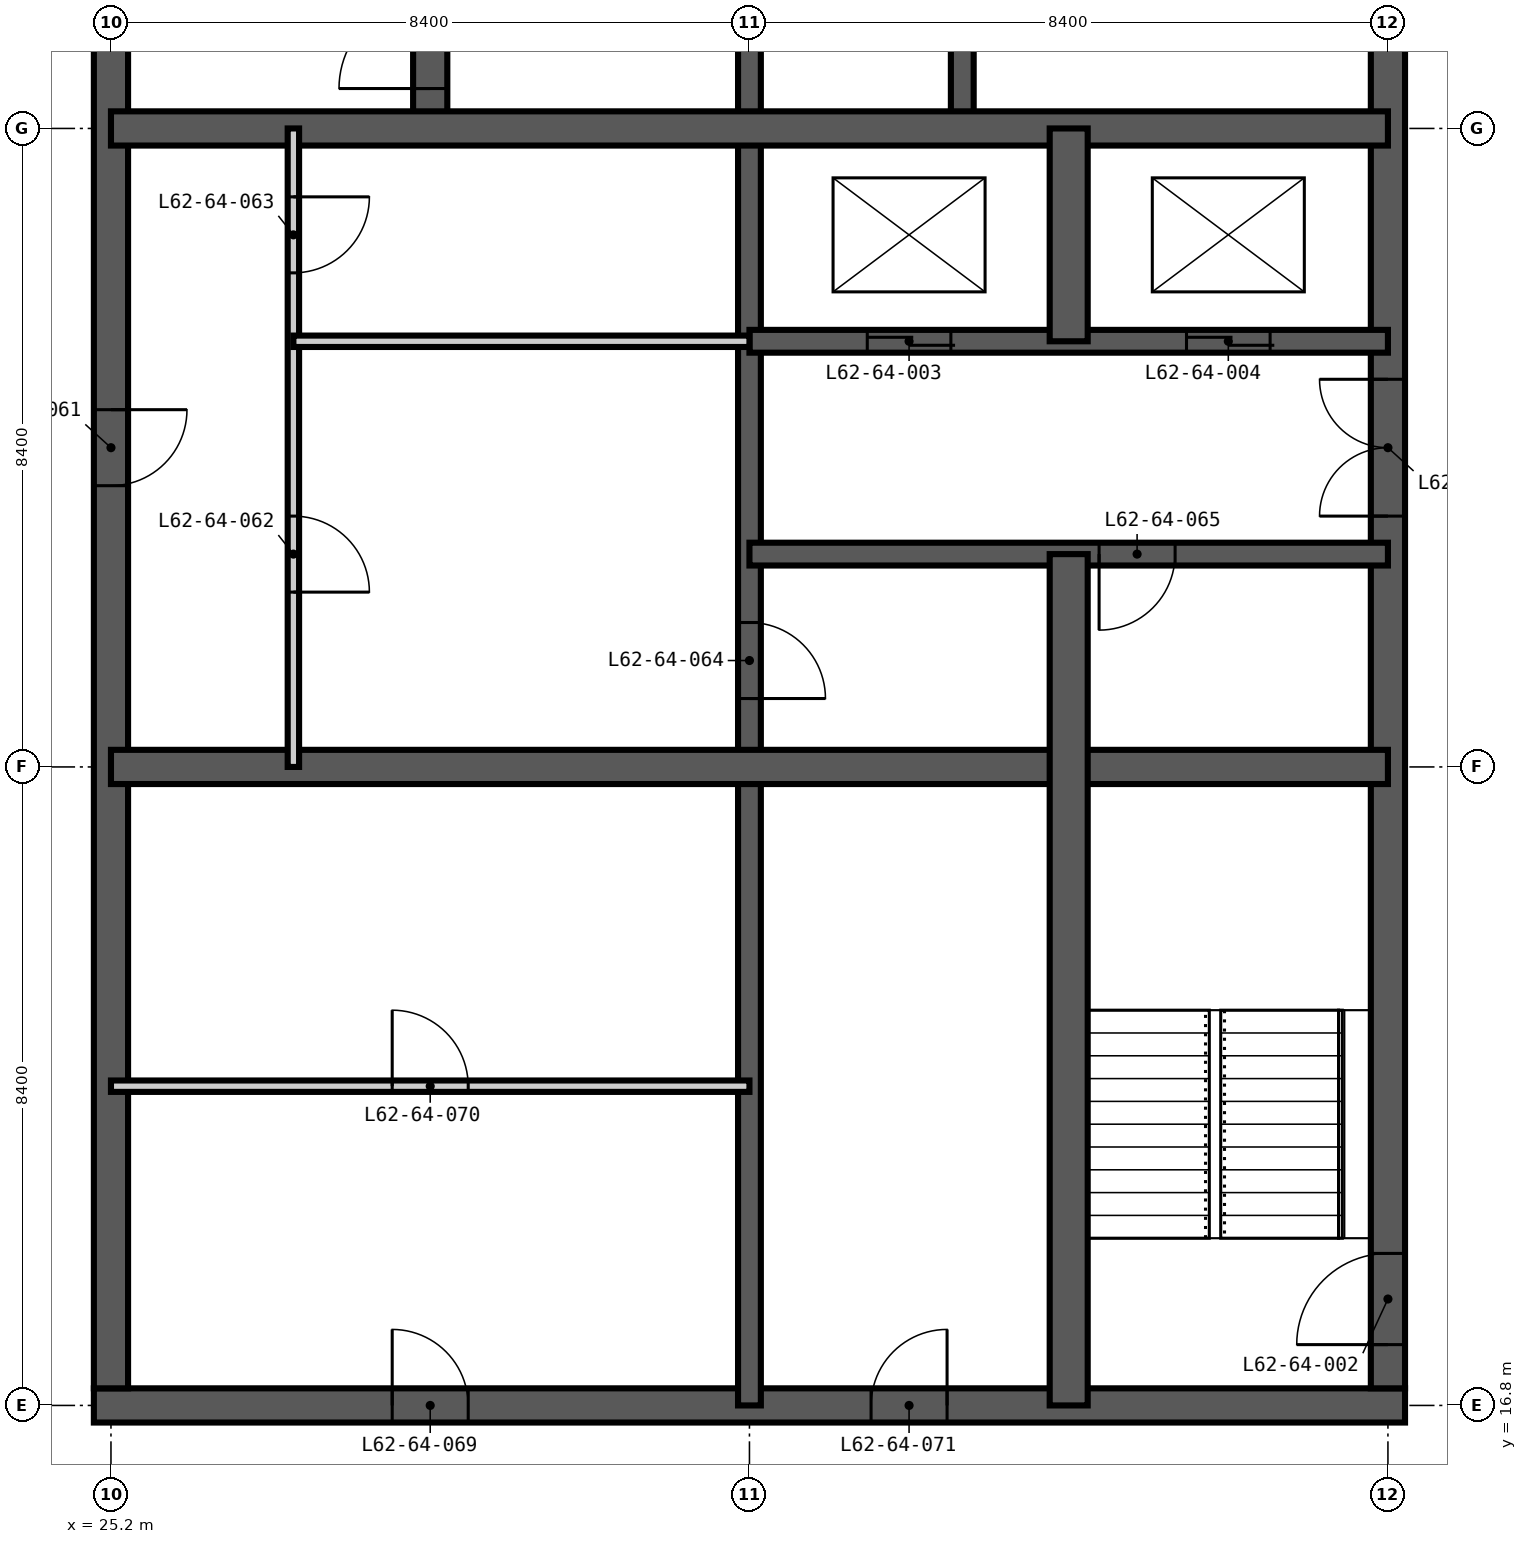
"""IFC4 building model, lengths in metres.
Left out: names, types, materials, properties, quantities, classifications, styles, units other than length and angle.
Written with IfcOpenShell. Run it as: python <this file> out.ifc"""

import sys

from ifc_helpers import new_model, si_unit, direction, frame, frame_2d, origin, place, context, subcontext, project, spatial, rectangle, extrude, element, fill, save


model = new_model("IFC4")
c1 = context("Model", 3, precision=1e-05, world=origin(), true_north=direction((0.0, 1.0)))
c2 = subcontext(c1, "Body", "Model", "MODEL_VIEW")
j1 = project(units=[si_unit("LENGTHUNIT", "METRE"), si_unit("PLANEANGLEUNIT", "RADIAN")], contexts=[c1])
p1 = place(None, origin())
s1 = spatial("IfcSite", under=j1, at=p1, CompositionType="ELEMENT")
p2 = place(p1, origin())
s2 = spatial("IfcBuilding", under=s1, at=p2, CompositionType="ELEMENT")
p3 = place(p2, frame((0.0, 0.0, 241.2)))
s3 = spatial("IfcBuildingStorey", under=s2, at=p3, CompositionType="ELEMENT", Elevation=241.2)
p4 = place(p3, frame((24.975, 16.8, -0.35), z_axis=(0.0, 0.0, 1.0), x_axis=(1.0, 0.0, 0.0)))
e1 = element("IfcWall", 1, at=p4, inside=s3, PredefinedType="SHEAR", context=c2, shape_type="SweptSolid", body=[
    extrude(rectangle(XDim=17.25, YDim=0.45, at=frame_2d((8.625, 0.0))), origin(), (0.0, 0.0, 1.0), 3.9),
])
p5 = place(p4, frame((3.925, 0.0, 0.35)))
e2 = element("IfcOpeningElement", 2, at=p5, cuts=e1, PredefinedType="OPENING", context=c2, shape_type="SweptSolid", body=[
    extrude(rectangle(XDim=1.0, YDim=2.1, at=frame_2d((0.5, 1.05))), frame((0.0, 0.235, 0.0), z_axis=(0.0, -1.0, 0.0), x_axis=(1.0, 0.0, 0.0)), (0.0, 0.0, 1.0), 0.47),
])
p6 = place(p4, frame((10.225, 0.0, 0.35)))
e3 = element("IfcOpeningElement", 3, at=p6, cuts=e1, PredefinedType="OPENING", context=c2, shape_type="SweptSolid", body=[
    extrude(rectangle(XDim=1.0, YDim=2.1, at=frame_2d((0.5, 1.05))), frame((0.0, 0.235, 0.0), z_axis=(0.0, -1.0, 0.0), x_axis=(1.0, 0.0, 0.0)), (0.0, 0.0, 1.0), 0.47),
])
p7 = place(p3, frame((42.0, 17.025, -0.35), z_axis=(0.0, 0.0, 1.0), x_axis=(0.0, 1.0, 0.0)))
e4 = element("IfcWall", 4, at=p7, inside=s3, PredefinedType="SHEAR", context=c2, shape_type="SweptSolid", body=[
    extrude(rectangle(XDim=24.75, YDim=0.45, at=frame_2d((12.375, 0.0))), origin(), (0.0, 0.0, 1.0), 3.9),
])
p8 = place(p7, frame((0.575, 0.0, 0.35)))
e5 = element("IfcOpeningElement", 5, at=p8, cuts=e4, PredefinedType="OPENING", context=c2, shape_type="SweptSolid", body=[
    extrude(rectangle(XDim=1.2, YDim=2.2, at=frame_2d((0.6, 1.1))), frame((0.0, 0.235, 0.0), z_axis=(0.0, -1.0, 0.0), x_axis=(1.0, 0.0, 0.0)), (0.0, 0.0, 1.0), 0.47),
])
p9 = place(p7, frame((11.475, 0.0, 0.35)))
e6 = element("IfcOpeningElement", 6, at=p9, cuts=e4, PredefinedType="OPENING", context=c2, shape_type="SweptSolid", body=[
    extrude(rectangle(XDim=1.8, YDim=2.2, at=frame_2d((0.9, 1.1))), frame((0.0, 0.235, 0.0), z_axis=(0.0, -1.0, 0.0), x_axis=(1.0, 0.0, 0.0)), (0.0, 0.0, 1.0), 0.47),
])
p10 = place(p7, frame((20.275, 0.0, 0.35)))
e7 = element("IfcOpeningElement", 7, at=p10, cuts=e4, PredefinedType="OPENING", context=c2, shape_type="SweptSolid", body=[
    extrude(rectangle(XDim=1.0, YDim=2.1, at=frame_2d((0.5, 1.05))), frame((0.0, 0.235, 0.0), z_axis=(0.0, -1.0, 0.0), x_axis=(1.0, 0.0, 0.0)), (0.0, 0.0, 1.0), 0.47),
])
p11 = place(p3, frame((25.2, 41.775, -0.35), z_axis=(0.0, 0.0, 1.0), x_axis=(0.0, -1.0, 0.0)))
e8 = element("IfcWall", 8, at=p11, inside=s3, PredefinedType="SHEAR", context=c2, shape_type="SweptSolid", body=[
    extrude(rectangle(XDim=24.75, YDim=0.45, at=frame_2d((12.375, 0.0))), origin(), (0.0, 0.0, 1.0), 3.9),
])
p12 = place(p11, frame((11.875, 0.0, 0.35)))
e9 = element("IfcOpeningElement", 9, at=p12, cuts=e8, PredefinedType="OPENING", context=c2, shape_type="SweptSolid", body=[
    extrude(rectangle(XDim=1.0, YDim=2.1, at=frame_2d((0.5, 1.05))), frame((0.0, 0.235, 0.0), z_axis=(0.0, -1.0, 0.0), x_axis=(1.0, 0.0, 0.0)), (0.0, 0.0, 1.0), 0.47),
])
p13 = place(p3, frame((33.6, 16.8, -0.35), z_axis=(0.0, 0.0, 1.0), x_axis=(0.0, 1.0, 0.0)))
e10 = element("IfcWall", 10, at=p13, inside=s3, PredefinedType="SHEAR", context=c2, shape_type="SweptSolid", body=[
    extrude(rectangle(XDim=25.2, YDim=0.3, at=frame_2d((12.6, 0.0))), origin(), (0.0, 0.0, 1.0), 3.9),
])
p14 = place(p13, frame((22.5, 0.0, 0.35)))
e11 = element("IfcOpeningElement", 11, at=p14, cuts=e10, PredefinedType="OPENING", context=c2, shape_type="SweptSolid", body=[
    extrude(rectangle(XDim=1.2, YDim=2.2, at=frame_2d((0.6, 1.1))), frame((0.0, 0.16, 0.0), z_axis=(0.0, -1.0, 0.0), x_axis=(1.0, 0.0, 0.0)), (0.0, 0.0, 1.0), 0.32),
])
p15 = place(p13, frame((18.3, 0.0, 0.35)))
e12 = element("IfcOpeningElement", 12, at=p15, cuts=e10, PredefinedType="OPENING", context=c2, shape_type="SweptSolid", body=[
    extrude(rectangle(XDim=1.2, YDim=2.2, at=frame_2d((0.6, 1.1))), frame((0.0, 0.16, 0.0), z_axis=(0.0, -1.0, 0.0), x_axis=(1.0, 0.0, 0.0)), (0.0, 0.0, 1.0), 0.32),
])
p16 = place(p13, frame((9.3, 0.0, 0.35)))
e13 = element("IfcOpeningElement", 13, at=p16, cuts=e10, PredefinedType="OPENING", context=c2, shape_type="SweptSolid", body=[
    extrude(rectangle(XDim=1.0, YDim=2.1, at=frame_2d((0.5, 1.05))), frame((0.0, 0.16, 0.0), z_axis=(0.0, -1.0, 0.0), x_axis=(1.0, 0.0, 0.0)), (0.0, 0.0, 1.0), 0.32),
])
p17 = place(p3, frame((36.4, 33.6, -0.35), z_axis=(0.0, 0.0, 1.0), x_axis=(0.0, 1.0, 0.0)))
e14 = element("IfcWall", 14, at=p17, inside=s3, PredefinedType="SHEAR", context=c2, shape_type="SweptSolid", body=[
    extrude(rectangle(XDim=8.4, YDim=0.3, at=frame_2d((4.2, 0.0))), origin(), (0.0, 0.0, 1.0), 3.9),
])
p18 = place(p3, frame((33.6, 28.0, -0.35), z_axis=(0.0, 0.0, 1.0), x_axis=(1.0, 0.0, 0.0)))
e15 = element("IfcWall", 15, at=p18, inside=s3, PredefinedType="SHEAR", context=c2, shape_type="SweptSolid", body=[
    extrude(rectangle(XDim=8.4, YDim=0.3, at=frame_2d((4.2, 0.0))), origin(), (0.0, 0.0, 1.0), 3.9),
])
p19 = place(p18, frame((4.6, 0.0, 0.35)))
e16 = element("IfcOpeningElement", 16, at=p19, cuts=e15, PredefinedType="OPENING", context=c2, shape_type="SweptSolid", body=[
    extrude(rectangle(XDim=1.0, YDim=2.1, at=frame_2d((0.5, 1.05))), frame((0.0, 0.16, 0.0), z_axis=(0.0, -1.0, 0.0), x_axis=(1.0, 0.0, 0.0)), (0.0, 0.0, 1.0), 0.32),
])
p20 = place(p3, frame((33.6, 30.8, -0.35), z_axis=(0.0, 0.0, 1.0), x_axis=(1.0, 0.0, 0.0)))
e17 = element("IfcWall", 17, at=p20, inside=s3, PredefinedType="SHEAR", context=c2, shape_type="SweptSolid", body=[
    extrude(rectangle(XDim=8.4, YDim=0.3, at=frame_2d((4.2, 0.0))), origin(), (0.0, 0.0, 1.0), 3.9),
])
p21 = place(p20, frame((1.55, 0.0, 0.35)))
e18 = element("IfcOpeningElement", 18, at=p21, cuts=e17, PredefinedType="OPENING", context=c2, shape_type="SweptSolid", body=[
    extrude(rectangle(XDim=1.1, YDim=2.2, at=frame_2d((0.55, 1.1))), frame((0.0, 0.16, 0.0), z_axis=(0.0, -1.0, 0.0), x_axis=(1.0, 0.0, 0.0)), (0.0, 0.0, 1.0), 0.32),
])
p22 = place(p20, frame((5.75, 0.0, 0.35)))
e19 = element("IfcOpeningElement", 19, at=p22, cuts=e17, PredefinedType="OPENING", context=c2, shape_type="SweptSolid", body=[
    extrude(rectangle(XDim=1.1, YDim=2.2, at=frame_2d((0.55, 1.1))), frame((0.0, 0.16, 0.0), z_axis=(0.0, -1.0, 0.0), x_axis=(1.0, 0.0, 0.0)), (0.0, 0.0, 1.0), 0.32),
])
p23 = place(p3, frame((29.4, 33.6, -0.35), z_axis=(0.0, 0.0, 1.0), x_axis=(0.0, 1.0, 0.0)))
e20 = element("IfcWall", 20, at=p23, inside=s3, PredefinedType="SHEAR", context=c2, shape_type="SweptSolid", body=[
    extrude(rectangle(XDim=8.4, YDim=0.45, at=frame_2d((4.2, 0.0))), origin(), (0.0, 0.0, 1.0), 3.9),
])
p24 = place(p23, frame((0.525, 0.0, 0.35)))
e21 = element("IfcOpeningElement", 21, at=p24, cuts=e20, PredefinedType="OPENING", context=c2, shape_type="SweptSolid", body=[
    extrude(rectangle(XDim=1.2, YDim=2.2, at=frame_2d((0.6, 1.1))), frame((0.0, 0.235, 0.0), z_axis=(0.0, -1.0, 0.0), x_axis=(1.0, 0.0, 0.0)), (0.0, 0.0, 1.0), 0.47),
])
for number, where, z_axis, x_axis in (
    (22, (25.2, 25.2, -0.35), (0.0, 0.0, 1.0), (1.0, 0.0, 0.0)),
    (23, (25.2, 33.6, -0.35), (0.0, 0.0, 1.0), (1.0, 0.0, 0.0)),
):
    element("IfcWall", number, at=place(p3, frame(where, z_axis=z_axis, x_axis=x_axis)), inside=s3, PredefinedType="SHEAR", context=c2, shape_type="SweptSolid", body=[
        extrude(rectangle(XDim=16.8, YDim=0.45, at=frame_2d((8.4, 0.0))), origin(), (0.0, 0.0, 1.0), 3.9),
    ])
p25 = place(p3, frame((37.8, 16.8, -0.35), z_axis=(0.0, 0.0, 1.0), x_axis=(0.0, 1.0, 0.0)))
e24 = element("IfcWall", 24, at=p25, inside=s3, PredefinedType="SHEAR", context=c2, shape_type="SweptSolid", body=[
    extrude(rectangle(XDim=11.2, YDim=0.5, at=frame_2d((5.6, 0.0))), origin(), (0.0, 0.0, 1.0), 3.9),
])
p26 = place(p3, frame((37.8, 30.8, -0.35), z_axis=(0.0, 0.0, 1.0), x_axis=(0.0, 1.0, 0.0)))
e25 = element("IfcWall", 25, at=p26, inside=s3, PredefinedType="SHEAR", context=c2, shape_type="SweptSolid", body=[
    extrude(rectangle(XDim=2.8, YDim=0.5, at=frame_2d((1.4, 0.0))), origin(), (0.0, 0.0, 1.0), 3.9),
])
p27 = place(p3, frame((27.6, 25.2, 0.0), z_axis=(0.0, 0.0, 1.0), x_axis=(0.0, 1.0, 0.0)))
e26 = element("IfcWall", 26, at=p27, inside=s3, PredefinedType="PARTITIONING", context=c2, shape_type="SweptSolid", body=[
    extrude(rectangle(XDim=8.4, YDim=0.15, at=frame_2d((4.2, 0.0))), origin(), (0.0, 0.0, 1.0), 3.55),
])
p28 = place(p27, frame((2.3, 0.0, 0.0)))
e27 = element("IfcOpeningElement", 27, at=p28, cuts=e26, PredefinedType="OPENING", context=c2, shape_type="SweptSolid", body=[
    extrude(rectangle(XDim=1.0, YDim=2.1, at=frame_2d((0.5, 1.05))), frame((0.0, 0.085, 0.0), z_axis=(0.0, -1.0, 0.0), x_axis=(1.0, 0.0, 0.0)), (0.0, 0.0, 1.0), 0.17),
])
p29 = place(p27, frame((6.5, 0.0, 0.0)))
e28 = element("IfcOpeningElement", 28, at=p29, cuts=e26, PredefinedType="OPENING", context=c2, shape_type="SweptSolid", body=[
    extrude(rectangle(XDim=1.0, YDim=2.1, at=frame_2d((0.5, 1.05))), frame((0.0, 0.085, 0.0), z_axis=(0.0, -1.0, 0.0), x_axis=(1.0, 0.0, 0.0)), (0.0, 0.0, 1.0), 0.17),
])
p30 = place(p3, frame((25.2, 21.0, 0.0), z_axis=(0.0, 0.0, 1.0), x_axis=(1.0, 0.0, 0.0)))
e29 = element("IfcWall", 29, at=p30, inside=s3, PredefinedType="PARTITIONING", context=c2, shape_type="SweptSolid", body=[
    extrude(rectangle(XDim=8.4, YDim=0.15, at=frame_2d((4.2, 0.0))), origin(), (0.0, 0.0, 1.0), 3.55),
])
p31 = place(p30, frame((3.7, 0.0, 0.0)))
e30 = element("IfcOpeningElement", 30, at=p31, cuts=e29, PredefinedType="OPENING", context=c2, shape_type="SweptSolid", body=[
    extrude(rectangle(XDim=1.0, YDim=2.1, at=frame_2d((0.5, 1.05))), frame((0.0, 0.085, 0.0), z_axis=(0.0, -1.0, 0.0), x_axis=(1.0, 0.0, 0.0)), (0.0, 0.0, 1.0), 0.17),
])
p32 = place(p3, frame((27.6, 30.8, 0.0), z_axis=(0.0, 0.0, 1.0), x_axis=(1.0, 0.0, 0.0)))
e31 = element("IfcWall", 31, at=p32, inside=s3, PredefinedType="PARTITIONING", context=c2, shape_type="SweptSolid", body=[
    extrude(rectangle(XDim=6.0, YDim=0.15, at=frame_2d((3.0, 0.0))), origin(), (0.0, 0.0, 1.0), 3.55),
])
p33 = place(p24, origin())
e32 = element("IfcDoor", 32, at=p33, inside=s3, OperationType="SINGLE_SWING_LEFT", PredefinedType="DOOR", context=c2, shape_type="SweptSolid", body=[
    extrude(rectangle(XDim=1.2, YDim=2.2, at=frame_2d((0.6, 1.1))), frame((0.0, 0.025, 0.0), z_axis=(0.0, -1.0, 0.0), x_axis=(1.0, 0.0, 0.0)), (0.0, 0.0, 1.0), 0.05),
])
fill(e21, e32)
p34 = place(p8, origin())
e33 = element("IfcDoor", 33, at=p34, inside=s3, OperationType="SINGLE_SWING_LEFT", PredefinedType="DOOR", context=c2, shape_type="SweptSolid", body=[
    extrude(rectangle(XDim=1.2, YDim=2.2, at=frame_2d((0.6, 1.1))), frame((0.0, 0.025, 0.0), z_axis=(0.0, -1.0, 0.0), x_axis=(1.0, 0.0, 0.0)), (0.0, 0.0, 1.0), 0.05),
])
fill(e5, e33)
p35 = place(p21, origin())
e34 = element("IfcDoor", 34, at=p35, inside=s3, OperationType="DOUBLE_DOOR_SLIDING", PredefinedType="DOOR", context=c2, shape_type="SweptSolid", body=[
    extrude(rectangle(XDim=1.1, YDim=2.2, at=frame_2d((0.55, 1.1))), frame((0.0, 0.025, 0.0), z_axis=(0.0, -1.0, 0.0), x_axis=(1.0, 0.0, 0.0)), (0.0, 0.0, 1.0), 0.05),
])
fill(e18, e34)
p36 = place(p22, origin())
e35 = element("IfcDoor", 35, at=p36, inside=s3, OperationType="DOUBLE_DOOR_SLIDING", PredefinedType="DOOR", context=c2, shape_type="SweptSolid", body=[
    extrude(rectangle(XDim=1.1, YDim=2.2, at=frame_2d((0.55, 1.1))), frame((0.0, 0.025, 0.0), z_axis=(0.0, -1.0, 0.0), x_axis=(1.0, 0.0, 0.0)), (0.0, 0.0, 1.0), 0.05),
])
fill(e19, e35)
p37 = place(p12, origin())
e36 = element("IfcDoor", 36, at=p37, inside=s3, OperationType="SINGLE_SWING_LEFT", PredefinedType="DOOR", context=c2, shape_type="SweptSolid", body=[
    extrude(rectangle(XDim=1.0, YDim=2.1, at=frame_2d((0.5, 1.05))), frame((0.0, 0.025, 0.0), z_axis=(0.0, -1.0, 0.0), x_axis=(1.0, 0.0, 0.0)), (0.0, 0.0, 1.0), 0.05),
])
fill(e9, e36)
p38 = place(p28, frame((1.0, 0.0, 0.0), z_axis=(0.0, 0.0, 1.0), x_axis=(-1.0, 0.0, 0.0)))
e37 = element("IfcDoor", 37, at=p38, inside=s3, OperationType="SINGLE_SWING_RIGHT", PredefinedType="DOOR", context=c2, shape_type="SweptSolid", body=[
    extrude(rectangle(XDim=1.0, YDim=2.1, at=frame_2d((0.5, 1.05))), frame((0.0, 0.025, 0.0), z_axis=(0.0, -1.0, 0.0), x_axis=(1.0, 0.0, 0.0)), (0.0, 0.0, 1.0), 0.05),
])
fill(e27, e37)
p39 = place(p29, frame((1.0, 0.0, 0.0), z_axis=(0.0, 0.0, 1.0), x_axis=(-1.0, 0.0, 0.0)))
e38 = element("IfcDoor", 38, at=p39, inside=s3, OperationType="SINGLE_SWING_LEFT", PredefinedType="DOOR", context=c2, shape_type="SweptSolid", body=[
    extrude(rectangle(XDim=1.0, YDim=2.1, at=frame_2d((0.5, 1.05))), frame((0.0, 0.025, 0.0), z_axis=(0.0, -1.0, 0.0), x_axis=(1.0, 0.0, 0.0)), (0.0, 0.0, 1.0), 0.05),
])
fill(e28, e38)
p40 = place(p16, frame((1.0, 0.0, 0.0), z_axis=(0.0, 0.0, 1.0), x_axis=(-1.0, 0.0, 0.0)))
e39 = element("IfcDoor", 39, at=p40, inside=s3, OperationType="SINGLE_SWING_RIGHT", PredefinedType="DOOR", context=c2, shape_type="SweptSolid", body=[
    extrude(rectangle(XDim=1.0, YDim=2.1, at=frame_2d((0.5, 1.05))), frame((0.0, 0.025, 0.0), z_axis=(0.0, -1.0, 0.0), x_axis=(1.0, 0.0, 0.0)), (0.0, 0.0, 1.0), 0.05),
])
fill(e13, e39)
p41 = place(p19, frame((1.0, 0.0, 0.0), z_axis=(0.0, 0.0, 1.0), x_axis=(-1.0, 0.0, 0.0)))
e40 = element("IfcDoor", 40, at=p41, inside=s3, OperationType="SINGLE_SWING_RIGHT", PredefinedType="DOOR", context=c2, shape_type="SweptSolid", body=[
    extrude(rectangle(XDim=1.0, YDim=2.1, at=frame_2d((0.5, 1.05))), frame((0.0, 0.025, 0.0), z_axis=(0.0, -1.0, 0.0), x_axis=(1.0, 0.0, 0.0)), (0.0, 0.0, 1.0), 0.05),
])
fill(e16, e40)
p42 = place(p9, origin())
e41 = element("IfcDoor", 41, at=p42, inside=s3, OperationType="DOUBLE_DOOR_DOUBLE_SWING", PredefinedType="DOOR", context=c2, shape_type="SweptSolid", body=[
    extrude(rectangle(XDim=1.8, YDim=2.2, at=frame_2d((0.9, 1.1))), frame((0.0, 0.025, 0.0), z_axis=(0.0, -1.0, 0.0), x_axis=(1.0, 0.0, 0.0)), (0.0, 0.0, 1.0), 0.05),
])
fill(e6, e41)
p43 = place(p5, origin())
e42 = element("IfcDoor", 42, at=p43, inside=s3, OperationType="SINGLE_SWING_LEFT", PredefinedType="DOOR", context=c2, shape_type="SweptSolid", body=[
    extrude(rectangle(XDim=1.0, YDim=2.1, at=frame_2d((0.5, 1.05))), frame((0.0, 0.025, 0.0), z_axis=(0.0, -1.0, 0.0), x_axis=(1.0, 0.0, 0.0)), (0.0, 0.0, 1.0), 0.05),
])
fill(e2, e42)
p44 = place(p31, origin())
e43 = element("IfcDoor", 43, at=p44, inside=s3, OperationType="SINGLE_SWING_LEFT", PredefinedType="DOOR", context=c2, shape_type="SweptSolid", body=[
    extrude(rectangle(XDim=1.0, YDim=2.1, at=frame_2d((0.5, 1.05))), frame((0.0, 0.025, 0.0), z_axis=(0.0, -1.0, 0.0), x_axis=(1.0, 0.0, 0.0)), (0.0, 0.0, 1.0), 0.05),
])
fill(e30, e43)
p45 = place(p6, origin())
e44 = element("IfcDoor", 44, at=p45, inside=s3, OperationType="SINGLE_SWING_RIGHT", PredefinedType="DOOR", context=c2, shape_type="SweptSolid", body=[
    extrude(rectangle(XDim=1.0, YDim=2.1, at=frame_2d((0.5, 1.05))), frame((0.0, 0.025, 0.0), z_axis=(0.0, -1.0, 0.0), x_axis=(1.0, 0.0, 0.0)), (0.0, 0.0, 1.0), 0.05),
])
fill(e3, e44)
save(model, sys.argv[1])
